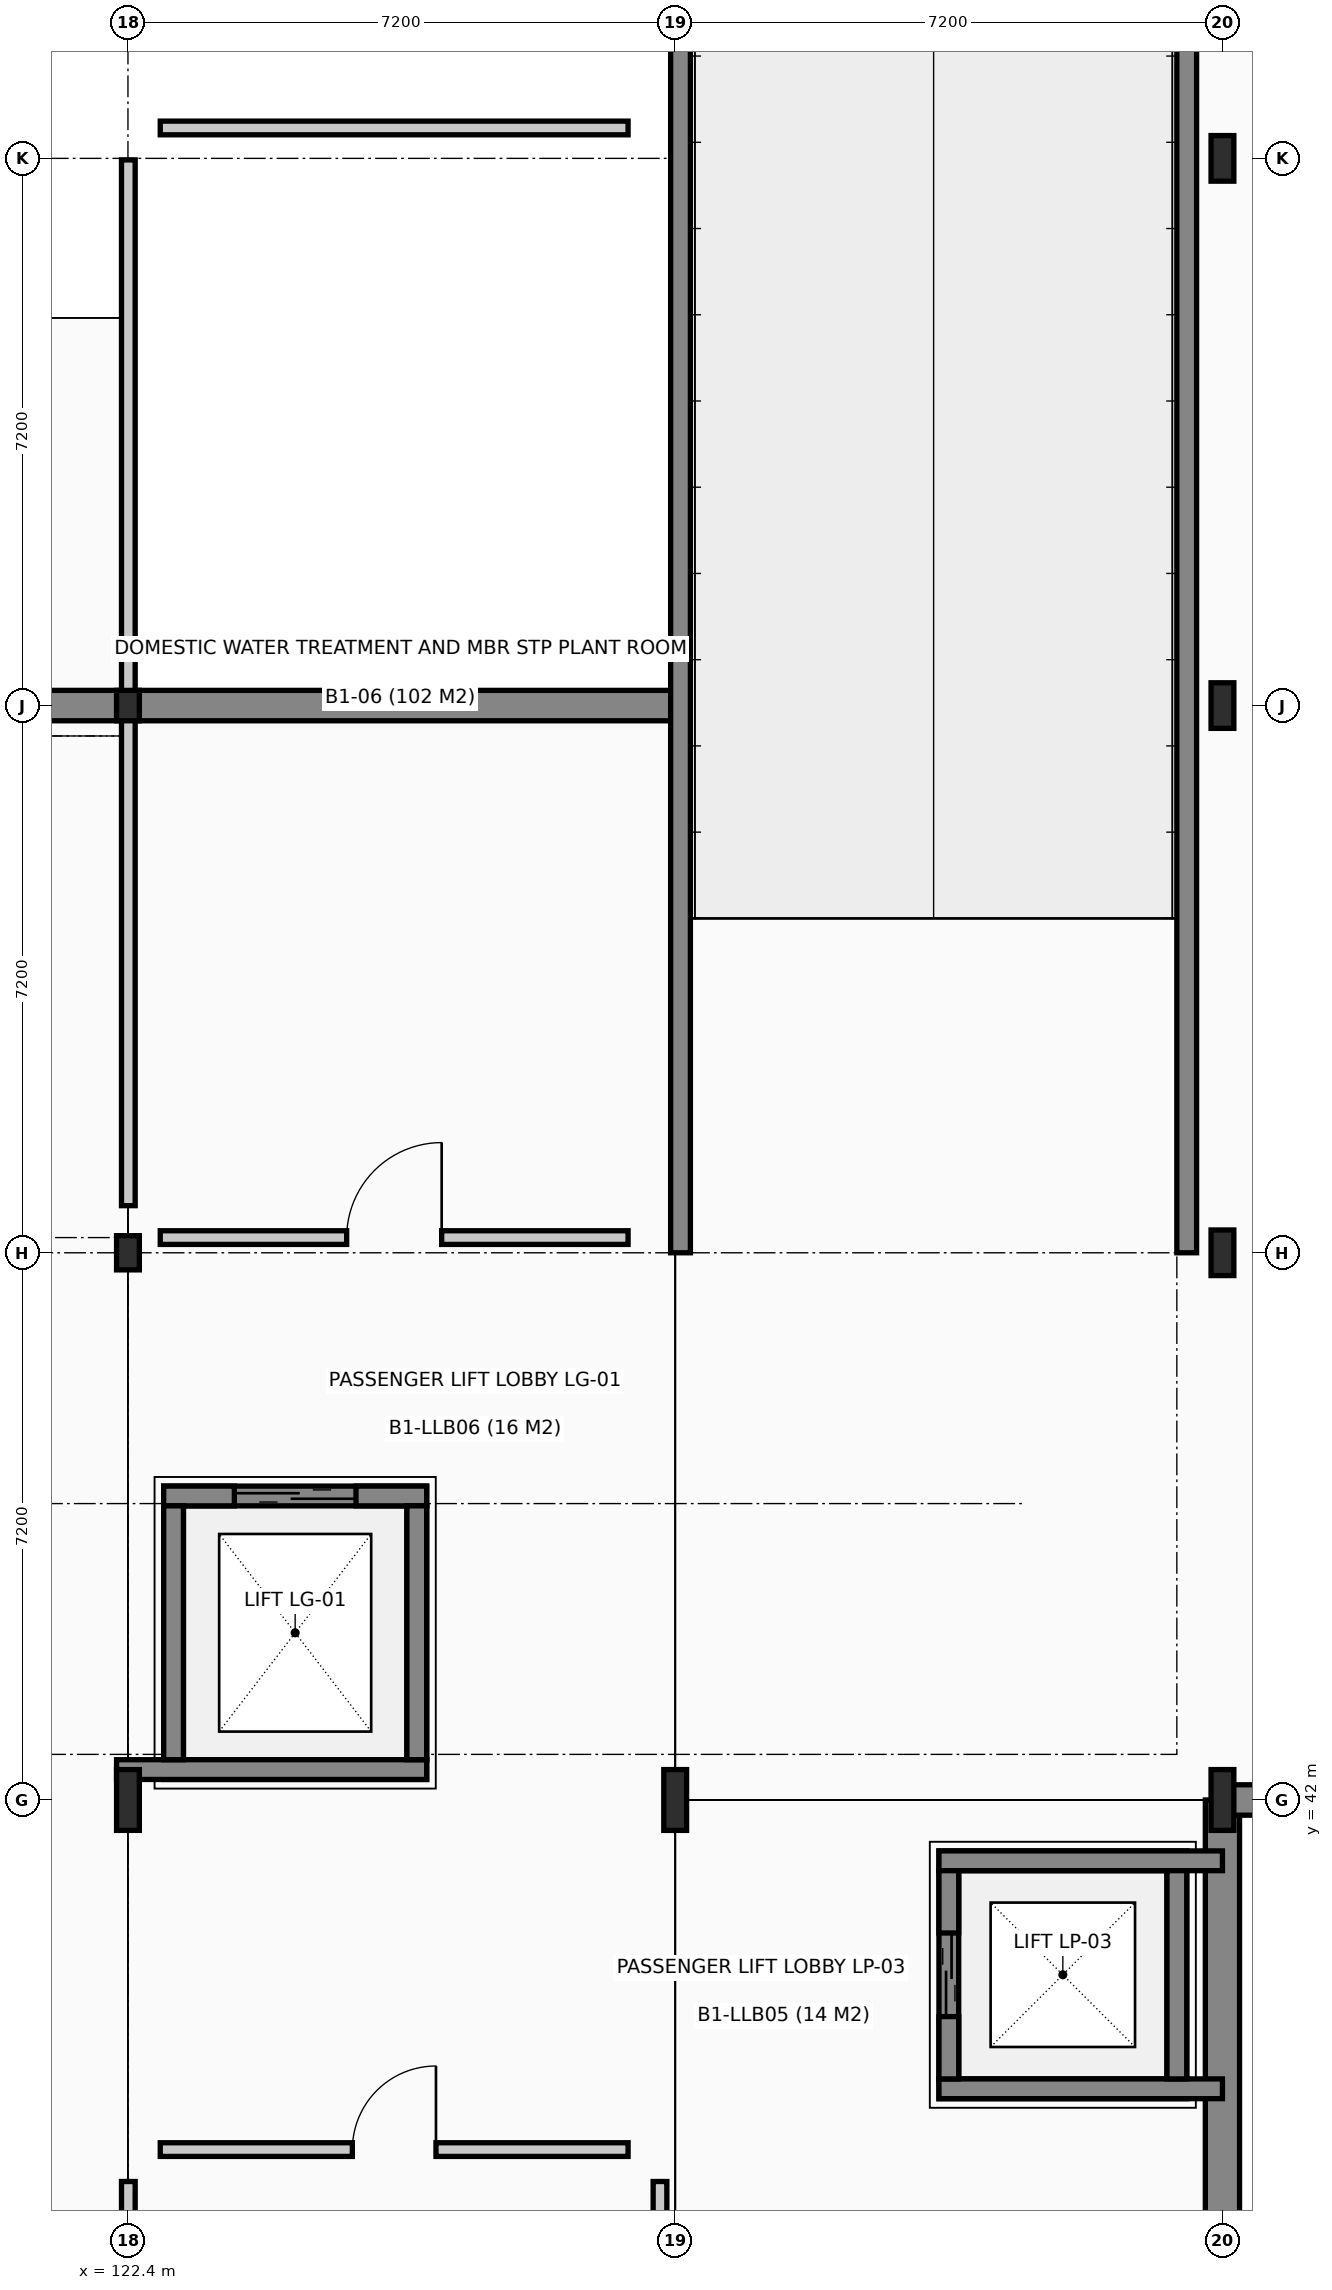
"""IFC4 building model, lengths in metres.
Left out: names, types, materials, properties, quantities, classifications, styles, units other than length and angle.
Written with IfcOpenShell. Run it as: python <this file> out.ifc"""

import sys

from ifc_helpers import new_model, si_unit, direction, frame, frame_2d, origin, origin_2d, place, context, subcontext, project, spatial, rectangle, i_section, extrude, element, fill, save


model = new_model("IFC4")
c1 = context("Model", 3, precision=1e-05, world=origin(), true_north=direction((0.0, 1.0)))
c2 = subcontext(c1, "Body", "Model", "MODEL_VIEW")
j1 = project(units=[si_unit("LENGTHUNIT", "METRE"), si_unit("PLANEANGLEUNIT", "RADIAN")], contexts=[c1])
p1 = place(None, origin())
s1 = spatial("IfcSite", under=j1, at=p1, CompositionType="ELEMENT")
p2 = place(p1, origin())
s2 = spatial("IfcBuilding", under=s1, at=p2, CompositionType="ELEMENT")
p3 = place(p2, frame((0.0, 0.0, -4.8)))
s3 = spatial("IfcBuildingStorey", under=s2, at=p3, CompositionType="ELEMENT", Elevation=-4.8)
p4 = place(p3, frame((122.4, 42.0, 0.0), z_axis=(0.0, 0.0, 1.0), x_axis=(1.0, 0.0, 0.0)))
e1 = element("IfcColumn", 1, at=p4, inside=s3, PredefinedType="COLUMN", context=c2, shape_type="SweptSolid", body=[
    extrude(i_section(OverallWidth=0.3, OverallDepth=0.8, WebThickness=0.018, FlangeThickness=0.033, at=origin_2d()), origin(), (0.0, 0.0, 1.0), 4.8),
])
p5 = place(p3, frame((122.4, 49.2, 0.0), z_axis=(0.0, 0.0, 1.0), x_axis=(1.0, 0.0, 0.0)))
e2 = element("IfcColumn", 2, at=p5, inside=s3, PredefinedType="COLUMN", context=c2, shape_type="SweptSolid", body=[
    extrude(i_section(OverallWidth=0.3, OverallDepth=0.45, WebThickness=0.014, FlangeThickness=0.026, at=origin_2d()), origin(), (0.0, 0.0, 1.0), 4.8),
])
p6 = place(p3, frame((122.4, 56.4, 0.0), z_axis=(0.0, 0.0, 1.0), x_axis=(1.0, 0.0, 0.0)))
e3 = element("IfcColumn", 3, at=p6, inside=s3, PredefinedType="COLUMN", context=c2, shape_type="SweptSolid", body=[
    extrude(i_section(OverallWidth=0.3, OverallDepth=0.4, WebThickness=0.013, FlangeThickness=0.024, at=origin_2d()), origin(), (0.0, 0.0, 1.0), 4.8),
])
for number, where, z_axis, x_axis in (
    (4, (129.6, 42.0, 0.0), (0.0, 0.0, 1.0), (1.0, 0.0, 0.0)),
    (5, (136.8, 42.0, 0.0), (0.0, 0.0, 1.0), (1.0, 0.0, 0.0)),
):
    element("IfcColumn", number, at=place(p3, frame(where, z_axis=z_axis, x_axis=x_axis)), inside=s3, PredefinedType="COLUMN", context=c2, shape_type="SweptSolid", body=[
        extrude(i_section(OverallWidth=0.3, OverallDepth=0.8, WebThickness=0.018, FlangeThickness=0.033, at=origin_2d()), origin(), (0.0, 0.0, 1.0), 4.8),
    ])
for number, where, z_axis, x_axis in (
    (6, (136.8, 49.2, 0.0), (0.0, 0.0, 1.0), (1.0, 0.0, 0.0)),
    (7, (136.8, 56.4, 0.0), (0.0, 0.0, 1.0), (1.0, 0.0, 0.0)),
    (8, (136.8, 63.6, 0.0), (0.0, 0.0, 1.0), (1.0, 0.0, 0.0)),
):
    element("IfcColumn", number, at=place(p3, frame(where, z_axis=z_axis, x_axis=x_axis)), inside=s3, PredefinedType="COLUMN", context=c2, shape_type="SweptSolid", body=[
        extrude(i_section(OverallWidth=0.3, OverallDepth=0.6, WebThickness=0.015, FlangeThickness=0.03, at=origin_2d()), origin(), (0.0, 0.0, 1.0), 4.8),
    ])
p7 = place(p3, frame((136.8, 6.0, 0.0), z_axis=(0.0, 0.0, 1.0), x_axis=(0.0, 1.0, 0.0)))
e9 = element("IfcWall", 9, at=p7, inside=s3, PredefinedType="USERDEFINED", context=c2, shape_type="SweptSolid", body=[
    extrude(rectangle(XDim=36.0, YDim=0.45, at=frame_2d((18.0, 0.0))), origin(), (0.0, 0.0, 1.0), 4.55),
])
p8 = place(p3, frame((136.8, 42.0, 0.0), z_axis=(0.0, 0.0, 1.0), x_axis=(1.0, 0.0, 0.0)))
e10 = element("IfcWall", 10, at=p8, inside=s3, PredefinedType="USERDEFINED", context=c2, shape_type="SweptSolid", body=[
    extrude(rectangle(XDim=24.6, YDim=0.4, at=frame_2d((12.3, 0.0))), origin(), (0.0, 0.0, 1.0), 4.55),
])
p9 = place(p3, frame((129.6, 56.4, 0.0), z_axis=(0.0, 0.0, 1.0), x_axis=(-1.0, 0.0, 0.0)))
e11 = element("IfcWall", 11, at=p9, inside=s3, PredefinedType="USERDEFINED", context=c2, shape_type="SweptSolid", body=[
    extrude(rectangle(XDim=43.2, YDim=0.4, at=frame_2d((21.6, 0.0))), origin(), (0.0, 0.0, 1.0), 4.55),
])
for number, where, z_axis, x_axis in (
    (12, (133.07, 38.2, -1.5), (0.0, 0.0, 1.0), (1.0, 0.0, 0.0)),
    (13, (133.07, 41.2, -1.5), (0.0, 0.0, 1.0), (1.0, 0.0, 0.0)),
):
    element("IfcWall", number, at=place(p3, frame(where, z_axis=z_axis, x_axis=x_axis)), inside=s3, PredefinedType="SHEAR", context=c2, shape_type="SweptSolid", body=[
        extrude(rectangle(XDim=3.26, YDim=0.26, at=frame_2d((1.63, 0.0))), origin(), (0.0, 0.0, 1.0), 1.5),
    ])
for number, where, z_axis, x_axis in (
    (14, (133.2, 38.33, -1.5), (0.0, 0.0, 1.0), (0.0, 1.0, 0.0)),
    (15, (136.2, 38.33, -1.5), (0.0, 0.0, 1.0), (0.0, 1.0, 0.0)),
):
    element("IfcWall", number, at=place(p3, frame(where, z_axis=z_axis, x_axis=x_axis)), inside=s3, PredefinedType="SHEAR", context=c2, shape_type="SweptSolid", body=[
        extrude(rectangle(XDim=2.74, YDim=0.26, at=frame_2d((1.37, 0.0))), origin(), (0.0, 0.0, 1.0), 1.5),
    ])
for number, where, z_axis, x_axis in (
    (16, (133.07, 38.2, 0.0), (0.0, 0.0, 1.0), (1.0, 0.0, 0.0)),
    (17, (133.07, 41.2, 0.0), (0.0, 0.0, 1.0), (1.0, 0.0, 0.0)),
):
    element("IfcWall", number, at=place(p3, frame(where, z_axis=z_axis, x_axis=x_axis)), inside=s3, PredefinedType="SHEAR", context=c2, shape_type="SweptSolid", body=[
        extrude(rectangle(XDim=3.73, YDim=0.26, at=frame_2d((1.865, 0.0))), origin(), (0.0, 0.0, 1.0), 4.55),
    ])
p10 = place(p3, frame((133.2, 38.33, 0.0), z_axis=(0.0, 0.0, 1.0), x_axis=(0.0, 1.0, 0.0)))
e18 = element("IfcWall", 18, at=p10, inside=s3, PredefinedType="SHEAR", context=c2, shape_type="SweptSolid", body=[
    extrude(rectangle(XDim=2.74, YDim=0.26, at=frame_2d((1.37, 0.0))), origin(), (0.0, 0.0, 1.0), 4.55),
])
p11 = place(p10, frame((0.82, 0.0, 0.0)))
e19 = element("IfcOpeningElement", 19, at=p11, cuts=e18, PredefinedType="OPENING", context=c2, shape_type="SweptSolid", body=[
    extrude(rectangle(XDim=1.1, YDim=2.15, at=frame_2d((0.55, 1.075))), frame((0.0, 0.14, 0.0), z_axis=(0.0, -1.0, 0.0), x_axis=(1.0, 0.0, 0.0)), (0.0, 0.0, 1.0), 0.28),
])
p12 = place(p3, frame((136.2, 38.33, 0.0), z_axis=(0.0, 0.0, 1.0), x_axis=(0.0, 1.0, 0.0)))
e20 = element("IfcWall", 20, at=p12, inside=s3, PredefinedType="SHEAR", context=c2, shape_type="SweptSolid", body=[
    extrude(rectangle(XDim=2.74, YDim=0.26, at=frame_2d((1.37, 0.0))), origin(), (0.0, 0.0, 1.0), 4.55),
])
for number, where, z_axis, x_axis in (
    (21, (122.87, 42.4, -1.5), (0.0, 0.0, 1.0), (1.0, 0.0, 0.0)),
    (22, (122.87, 46.0, -1.5), (0.0, 0.0, 1.0), (1.0, 0.0, 0.0)),
):
    element("IfcWall", number, at=place(p3, frame(where, z_axis=z_axis, x_axis=x_axis)), inside=s3, PredefinedType="SHEAR", context=c2, shape_type="SweptSolid", body=[
        extrude(rectangle(XDim=3.46, YDim=0.26, at=frame_2d((1.73, 0.0))), origin(), (0.0, 0.0, 1.0), 1.5),
    ])
for number, where, z_axis, x_axis in (
    (23, (123.0, 42.53, -1.5), (0.0, 0.0, 1.0), (0.0, 1.0, 0.0)),
    (24, (126.2, 42.53, -1.5), (0.0, 0.0, 1.0), (0.0, 1.0, 0.0)),
):
    element("IfcWall", number, at=place(p3, frame(where, z_axis=z_axis, x_axis=x_axis)), inside=s3, PredefinedType="SHEAR", context=c2, shape_type="SweptSolid", body=[
        extrude(rectangle(XDim=3.34, YDim=0.26, at=frame_2d((1.67, 0.0))), origin(), (0.0, 0.0, 1.0), 1.5),
    ])
p13 = place(p3, frame((122.25, 42.4, 0.0), z_axis=(0.0, 0.0, 1.0), x_axis=(1.0, 0.0, 0.0)))
e25 = element("IfcWall", 25, at=p13, inside=s3, PredefinedType="SHEAR", context=c2, shape_type="SweptSolid", body=[
    extrude(rectangle(XDim=4.08, YDim=0.26, at=frame_2d((2.04, 0.0))), origin(), (0.0, 0.0, 1.0), 4.55),
])
p14 = place(p3, frame((122.87, 46.0, 0.0), z_axis=(0.0, 0.0, 1.0), x_axis=(1.0, 0.0, 0.0)))
e26 = element("IfcWall", 26, at=p14, inside=s3, PredefinedType="SHEAR", context=c2, shape_type="SweptSolid", body=[
    extrude(rectangle(XDim=3.46, YDim=0.26, at=frame_2d((1.73, 0.0))), origin(), (0.0, 0.0, 1.0), 4.55),
])
p15 = place(p14, frame((0.93, 0.0, 0.0)))
e27 = element("IfcOpeningElement", 27, at=p15, cuts=e26, PredefinedType="OPENING", context=c2, shape_type="SweptSolid", body=[
    extrude(rectangle(XDim=1.6, YDim=2.3, at=frame_2d((0.8, 1.15))), frame((0.0, 0.14, 0.0), z_axis=(0.0, -1.0, 0.0), x_axis=(1.0, 0.0, 0.0)), (0.0, 0.0, 1.0), 0.28),
])
for number, where, z_axis, x_axis in (
    (28, (123.0, 42.53, 0.0), (0.0, 0.0, 1.0), (0.0, 1.0, 0.0)),
    (29, (126.2, 42.53, 0.0), (0.0, 0.0, 1.0), (0.0, 1.0, 0.0)),
):
    element("IfcWall", number, at=place(p3, frame(where, z_axis=z_axis, x_axis=x_axis)), inside=s3, PredefinedType="SHEAR", context=c2, shape_type="SweptSolid", body=[
        extrude(rectangle(XDim=3.34, YDim=0.26, at=frame_2d((1.67, 0.0))), origin(), (0.0, 0.0, 1.0), 4.55),
    ])
for number, where, z_axis, x_axis in (
    (30, (129.67, 49.2, 0.0), (0.0, 0.0, 1.0), (0.0, 1.0, 0.0)),
    (31, (136.33, 49.2, 0.0), (0.0, 0.0, 1.0), (0.0, 1.0, 0.0)),
):
    element("IfcWall", number, at=place(p3, frame(where, z_axis=z_axis, x_axis=x_axis)), inside=s3, PredefinedType="SHEAR", context=c2, shape_type="SweptSolid", body=[
        extrude(rectangle(XDim=42.15, YDim=0.26, at=frame_2d((21.075, 0.0))), origin(), (0.0, 0.0, 1.0), 4.78),
    ])
p16 = place(p3, frame((122.825, 37.4, 0.0), z_axis=(0.0, 0.0, 1.0), x_axis=(1.0, 0.0, 0.0)))
e32 = element("IfcWall", 32, at=p16, inside=s3, PredefinedType="PARTITIONING", context=c2, shape_type="SweptSolid", body=[
    extrude(rectangle(XDim=6.155, YDim=0.18, at=frame_2d((3.078, 0.0))), origin(), (0.0, 0.0, 1.0), 4.535),
])
p17 = place(p16, frame((2.528, 0.0, 0.0)))
e33 = element("IfcOpeningElement", 33, at=p17, cuts=e32, PredefinedType="OPENING", context=c2, shape_type="SweptSolid", body=[
    extrude(rectangle(XDim=1.1, YDim=2.15, at=frame_2d((0.55, 1.075))), frame((0.0, 0.1, 0.0), z_axis=(0.0, -1.0, 0.0), x_axis=(1.0, 0.0, 0.0)), (0.0, 0.0, 1.0), 0.2),
])
for number, where, z_axis, x_axis in (
    (34, (122.405, 19.42, 0.0), (0.0, 0.0, 1.0), (0.0, 1.0, 0.0)),
    (35, (129.4, 19.42, 0.0), (0.0, 0.0, 1.0), (0.0, 1.0, 0.0)),
):
    element("IfcWall", number, at=place(p3, frame(where, z_axis=z_axis, x_axis=x_axis)), inside=s3, PredefinedType="PARTITIONING", context=c2, shape_type="SweptSolid", body=[
        extrude(rectangle(XDim=17.56, YDim=0.18, at=frame_2d((8.78, 0.0))), origin(), (0.0, 0.0, 1.0), 3.63),
    ])
p18 = place(p3, frame((122.825, 49.4, 0.0), z_axis=(0.0, 0.0, 1.0), x_axis=(1.0, 0.0, 0.0)))
e36 = element("IfcWall", 36, at=p18, inside=s3, PredefinedType="PARTITIONING", context=c2, shape_type="SweptSolid", body=[
    extrude(rectangle(XDim=6.155, YDim=0.18, at=frame_2d((3.078, 0.0))), origin(), (0.0, 0.0, 1.0), 3.83),
])
p19 = place(p18, frame((2.452, 0.0, 0.0)))
e37 = element("IfcOpeningElement", 37, at=p19, cuts=e36, PredefinedType="OPENING", context=c2, shape_type="SweptSolid", body=[
    extrude(rectangle(XDim=1.25, YDim=2.15, at=frame_2d((0.625, 1.075))), frame((0.0, 0.1, 0.0), z_axis=(0.0, -1.0, 0.0), x_axis=(1.0, 0.0, 0.0)), (0.0, 0.0, 1.0), 0.2),
])
p20 = place(p3, frame((122.825, 64.0, 0.0), z_axis=(0.0, 0.0, 1.0), x_axis=(1.0, 0.0, 0.0)))
e38 = element("IfcWall", 38, at=p20, inside=s3, PredefinedType="PARTITIONING", context=c2, shape_type="SweptSolid", body=[
    extrude(rectangle(XDim=6.155, YDim=0.18, at=frame_2d((3.078, 0.0))), origin(), (0.0, 0.0, 1.0), 4.535),
])
p21 = place(p3, frame((122.405, 49.82, 0.0), z_axis=(0.0, 0.0, 1.0), x_axis=(0.0, 1.0, 0.0)))
e39 = element("IfcWall", 39, at=p21, inside=s3, PredefinedType="PARTITIONING", context=c2, shape_type="SweptSolid", body=[
    extrude(rectangle(XDim=13.76, YDim=0.18, at=frame_2d((6.88, 0.0))), origin(), (0.0, 0.0, 1.0), 3.63),
])
p22 = place(p11, origin())
e40 = element("IfcDoor", 40, at=p22, inside=s3, OperationType="DOUBLE_DOOR_SLIDING", PredefinedType="DOOR", context=c2, shape_type="SweptSolid", body=[
    extrude(rectangle(XDim=1.1, YDim=2.15, at=frame_2d((0.55, 1.075))), frame((0.0, 0.025, 0.0), z_axis=(0.0, -1.0, 0.0), x_axis=(1.0, 0.0, 0.0)), (0.0, 0.0, 1.0), 0.05),
])
fill(e19, e40)
p23 = place(p15, origin())
e41 = element("IfcDoor", 41, at=p23, inside=s3, OperationType="DOUBLE_DOOR_SLIDING", PredefinedType="DOOR", context=c2, shape_type="SweptSolid", body=[
    extrude(rectangle(XDim=1.6, YDim=2.3, at=frame_2d((0.8, 1.15))), frame((0.0, 0.025, 0.0), z_axis=(0.0, -1.0, 0.0), x_axis=(1.0, 0.0, 0.0)), (0.0, 0.0, 1.0), 0.05),
])
fill(e27, e41)
p24 = place(p17, frame((1.1, 0.0, 0.0), z_axis=(0.0, 0.0, 1.0), x_axis=(-1.0, 0.0, 0.0)))
e42 = element("IfcDoor", 42, at=p24, inside=s3, OperationType="SINGLE_SWING_LEFT", PredefinedType="DOOR", context=c2, shape_type="SweptSolid", body=[
    extrude(rectangle(XDim=1.1, YDim=2.15, at=frame_2d((0.55, 1.075))), frame((0.0, 0.025, 0.0), z_axis=(0.0, -1.0, 0.0), x_axis=(1.0, 0.0, 0.0)), (0.0, 0.0, 1.0), 0.05),
])
fill(e33, e42)
p25 = place(p19, origin())
e43 = element("IfcDoor", 43, at=p25, inside=s3, OperationType="SINGLE_SWING_RIGHT", PredefinedType="DOOR", context=c2, shape_type="SweptSolid", body=[
    extrude(rectangle(XDim=1.25, YDim=2.15, at=frame_2d((0.625, 1.075))), frame((0.0, 0.025, 0.0), z_axis=(0.0, -1.0, 0.0), x_axis=(1.0, 0.0, 0.0)), (0.0, 0.0, 1.0), 0.05),
])
fill(e37, e43)
save(model, sys.argv[1])
